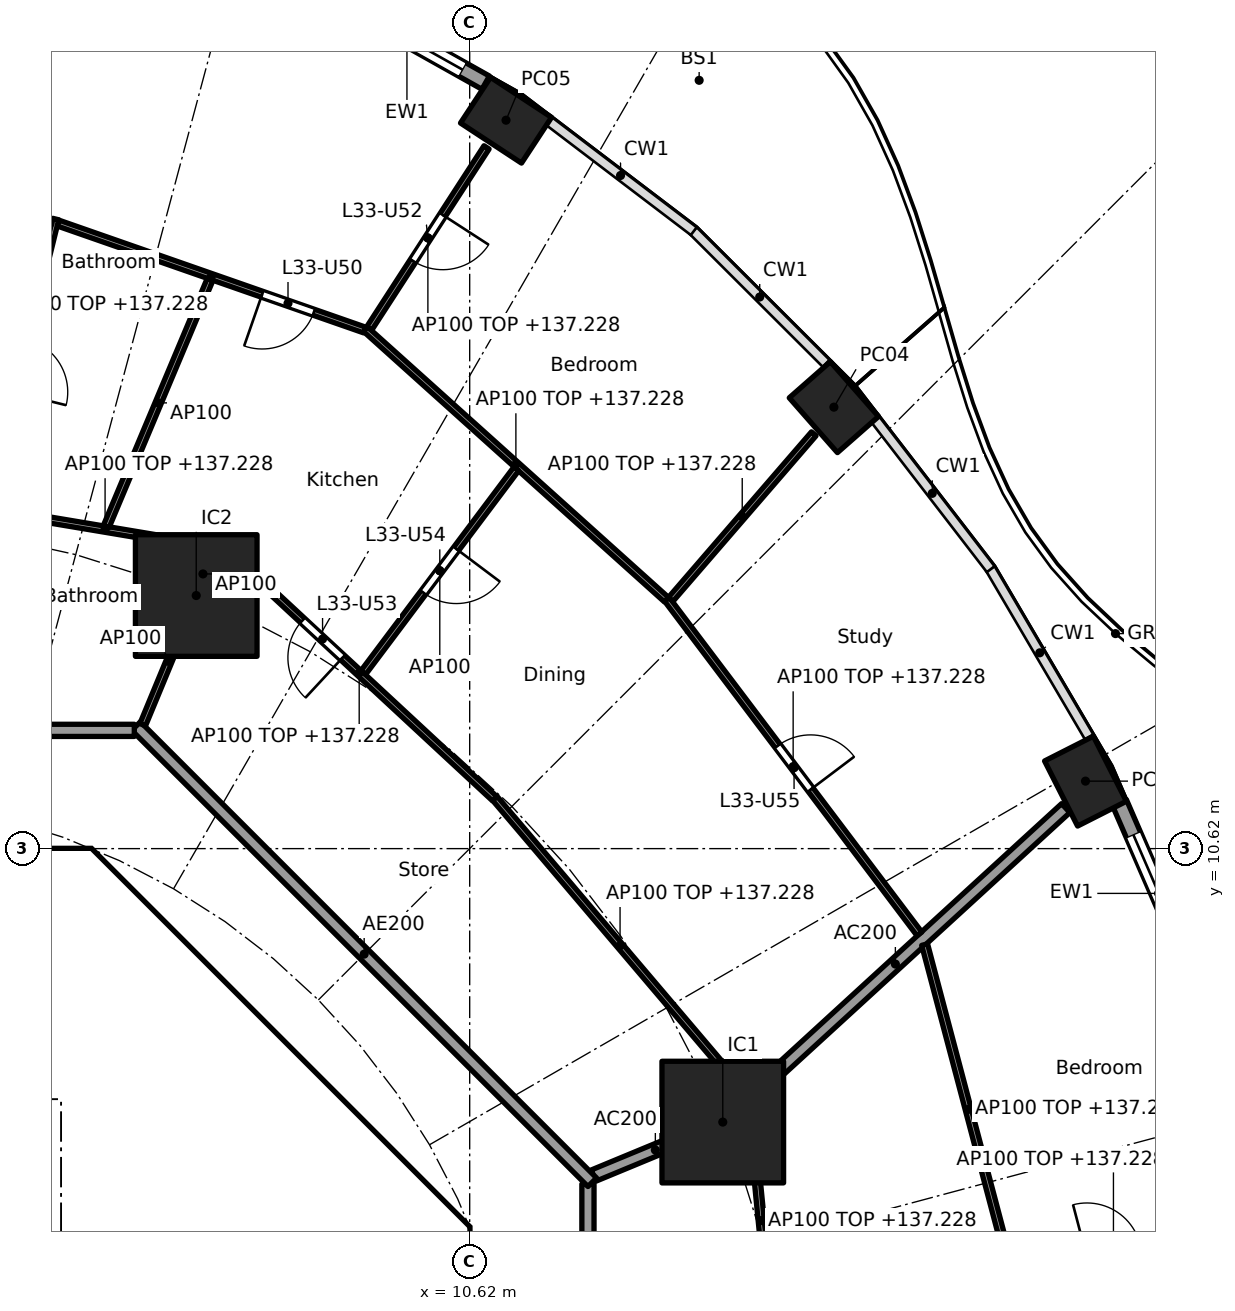
"""IFC4 building model, lengths in metres.
Left out: names, types, materials, properties, quantities, classifications, styles, units other than length and angle.
Written with IfcOpenShell. Run it as: python <this file> out.ifc"""

import sys

from ifc_helpers import new_model, si_unit, direction, frame, frame_2d, origin, origin_2d, place, context, subcontext, project, spatial, polyline, rectangle, hollow_rectangle, outline, extrude, element, fill, save


model = new_model("IFC4")
c1 = context("Model", 3, precision=1e-05, world=origin(), true_north=direction((0.0, 1.0)))
c2 = subcontext(c1, "Body", "Model", "MODEL_VIEW")
j1 = project(units=[si_unit("LENGTHUNIT", "METRE"), si_unit("PLANEANGLEUNIT", "RADIAN")], contexts=[c1])
p1 = place(None, origin())
s1 = spatial("IfcSite", under=j1, at=p1, CompositionType="ELEMENT")
p2 = place(p1, origin())
s2 = spatial("IfcBuilding", under=s1, at=p2, CompositionType="ELEMENT")
p3 = place(p2, frame((0.0, 0.0, 134.4)))
s3 = spatial("IfcBuildingStorey", under=s2, at=p3, CompositionType="ELEMENT", Elevation=134.4)
for number, where, z_axis, x_axis in (
    (1, (20.747, 11.73, 0.0), (0.0, 0.0, 1.0), (-0.452, 0.892, 0.0)),
    (2, (16.61, 17.88, 0.0), (0.0, 0.0, 1.0), (-0.66, 0.751, 0.0)),
    (3, (11.218, 22.599, 0.0), (0.0, 0.0, 1.0), (-0.836, 0.549, 0.0)),
):
    element("IfcColumn", number, at=place(p3, frame(where, z_axis=z_axis, x_axis=x_axis)), inside=s3, PredefinedType="COLUMN", context=c2, shape_type="SweptSolid", body=[
        extrude(hollow_rectangle(XDim=1.2, YDim=0.9, WallThickness=0.04, at=origin_2d()), origin(), (0.0, 0.0, 1.0), 3.7),
    ])
for number, where, z_axis, x_axis in (
    (4, (14.782, 6.123, 0.0), (0.0, 0.0, 1.0), (1.0, 0.0, 0.0)),
    (5, (6.123, 14.782, 0.0), (0.0, 0.0, 1.0), (1.0, 0.0, 0.0)),
):
    element("IfcColumn", number, at=place(p3, frame(where, z_axis=z_axis, x_axis=x_axis)), inside=s3, PredefinedType="COLUMN", context=c2, shape_type="SweptSolid", body=[
        extrude(rectangle(XDim=2.0, YDim=2.0, at=origin_2d()), origin(), (0.0, 0.0, 1.0), 3.7),
    ])
p4 = place(p3, frame((21.304, 11.38, 0.0), z_axis=(0.0, 0.0, 1.0), x_axis=(0.397575919276, -0.917569282622, 0.0)))
e6 = element("IfcWall", 6, at=p4, inside=s3, PredefinedType="SOLIDWALL", context=c2, shape_type="SweptSolid", body=[
    extrude(rectangle(XDim=3.261, YDim=0.25, at=frame_2d((1.63, 0.0))), origin(), (0.0, 0.0, 1.0), 3.44),
])
p5 = place(p4, frame((0.58, 0.0, 0.0)))
e7 = element("IfcOpeningElement", 7, at=p5, cuts=e6, PredefinedType="OPENING", context=c2, shape_type="SweptSolid", body=[
    extrude(rectangle(XDim=2.1, YDim=2.4, at=frame_2d((1.05, 1.2))), frame((0.0, 0.135, 0.0), z_axis=(0.0, -1.0, 0.0), x_axis=(1.0, 0.0, 0.0)), (0.0, 0.0, 1.0), 0.27),
])
p6 = place(p3, frame((8.293, 24.67, 0.0), z_axis=(0.0, 0.0, 1.0), x_axis=(0.87206688547, -0.489386705241, 0.0)))
e8 = element("IfcWall", 8, at=p6, inside=s3, PredefinedType="SOLIDWALL", context=c2, shape_type="SweptSolid", body=[
    extrude(rectangle(XDim=2.97, YDim=0.25, at=frame_2d((1.485, 0.0))), origin(), (0.0, 0.0, 1.0), 3.44),
])
p7 = place(p6, frame((0.435, 0.0, 0.0)))
e9 = element("IfcOpeningElement", 9, at=p7, cuts=e8, PredefinedType="OPENING", context=c2, shape_type="SweptSolid", body=[
    extrude(rectangle(XDim=2.1, YDim=2.4, at=frame_2d((1.05, 1.2))), frame((0.0, 0.135, 0.0), z_axis=(0.0, -1.0, 0.0), x_axis=(1.0, 0.0, 0.0)), (0.0, 0.0, 1.0), 0.27),
])
p8 = place(p3, frame((9.988, 4.613, 0.0), z_axis=(0.0, 0.0, 1.0), x_axis=(-0.707106781187, 0.707106781187, 0.0)))
e10 = element("IfcWall", 10, at=p8, inside=s3, PredefinedType="SHEAR", context=c2, shape_type="SweptSolid", body=[
    extrude(rectangle(XDim=7.602, YDim=0.6, at=frame_2d((3.801, 0.0))), origin(), (0.0, 0.0, 1.0), 3.44),
])
p9 = place(p8, frame((3.201, 0.0, 0.0)))
e11 = element("IfcOpeningElement", 11, at=p9, cuts=e10, PredefinedType="OPENING", context=c2, shape_type="SweptSolid", body=[
    extrude(rectangle(XDim=1.2, YDim=2.1, at=frame_2d((0.6, 1.05))), frame((0.0, 0.31, 0.0), z_axis=(0.0, -1.0, 0.0), x_axis=(1.0, 0.0, 0.0)), (0.0, 0.0, 1.0), 0.62),
])
p10 = place(p3, frame((4.0, 4.3, 0.0), z_axis=(0.0, 0.0, 1.0), x_axis=(0.0, 1.0, 0.0)))
e12 = element("IfcWall", 12, at=p10, inside=s3, PredefinedType="SOLIDWALL", context=c2, shape_type="SweptSolid", body=[
    extrude(rectangle(XDim=2.2, YDim=0.2, at=frame_2d((1.1, 0.0))), origin(), (0.0, 0.0, 1.0), 3.44),
])
p11 = place(p10, frame((0.55, 0.0, 0.0)))
e13 = element("IfcOpeningElement", 13, at=p11, cuts=e12, PredefinedType="OPENING", context=c2, shape_type="SweptSolid", body=[
    extrude(rectangle(XDim=1.1, YDim=2.1, at=frame_2d((0.55, 1.05))), frame((0.0, 0.11, 0.0), z_axis=(0.0, -1.0, 0.0), x_axis=(1.0, 0.0, 0.0)), (0.0, 0.0, 1.0), 0.22),
])
p12 = place(p3, frame((4.0, 7.025, 0.0), z_axis=(0.0, 0.0, 1.0), x_axis=(0.0, 1.0, 0.0)))
e14 = element("IfcWall", 14, at=p12, inside=s3, PredefinedType="SOLIDWALL", context=c2, shape_type="SweptSolid", body=[
    extrude(rectangle(XDim=3.0, YDim=0.2, at=frame_2d((1.5, 0.0))), origin(), (0.0, 0.0, 1.0), 3.44),
])
p13 = place(p12, frame((0.925, 0.0, 0.0)))
e15 = element("IfcOpeningElement", 15, at=p13, cuts=e14, PredefinedType="OPENING", context=c2, shape_type="SweptSolid", body=[
    extrude(rectangle(XDim=1.1, YDim=2.1, at=frame_2d((0.55, 1.05))), frame((0.0, 0.11, 0.0), z_axis=(0.0, -1.0, 0.0), x_axis=(1.0, 0.0, 0.0)), (0.0, 0.0, 1.0), 0.22),
])
p14 = place(p3, origin())
e16 = element("IfcWall", 16, at=p14, inside=s3, PredefinedType="SHEAR", context=c2, shape_type="SweptSolid", body=[
    extrude(outline(polyline([(-4.152, 10.025), (-4.401, 9.776), (-4.825, 10.2), (-4.401, 10.625), (4.401, 10.625), (4.825, 10.2), (4.401, 9.776), (4.152, 10.025), (-4.152, 10.025)])), origin(), (0.0, 0.0, 1.0), 3.44),
])
p15 = place(p3, origin())
e17 = element("IfcWall", 17, at=p15, inside=s3, PredefinedType="SHEAR", context=c2, shape_type="SweptSolid", body=[
    extrude(outline(polyline([(9.776, -4.401), (10.025, -4.152), (10.025, -3.801), (10.025, 4.152), (9.776, 4.401), (10.2, 4.825), (10.625, 4.401), (10.625, -4.401), (10.2, -4.825), (9.776, -4.401)])), origin(), (0.0, 0.0, 1.0), 3.44),
])
p16 = place(p3, origin())
e18 = element("IfcWall", 18, at=p16, inside=s3, PredefinedType="SOLIDWALL", context=c2, shape_type="SweptSolid", body=[
    extrude(outline(polyline([(4.1, 6.5), (-4.1, 6.5), (-4.1, 7.025), (4.1, 7.025), (4.1, 6.5)])), origin(), (0.0, 0.0, 1.0), 3.44),
])
p17 = place(p3, frame((12.657, 5.243, 0.0), z_axis=(0.0, 0.0, 1.0), x_axis=(0.923876145736, 0.382691608661, 0.0)))
e19 = element("IfcWall", 19, at=p17, inside=s3, PredefinedType="PARTITIONING", context=c2, shape_type="SweptSolid", body=[
    extrude(rectangle(XDim=2.2, YDim=0.2, at=frame_2d((1.1, 0.0))), origin(), (0.0, 0.0, 1.0), 3.44),
])
p18 = place(p3, frame((14.819, 6.157, 0.0), z_axis=(0.0, 0.0, 1.0), x_axis=(0.737608883396, 0.675228209671, 0.0)))
e20 = element("IfcWall", 20, at=p18, inside=s3, PredefinedType="PARTITIONING", context=c2, shape_type="SweptSolid", body=[
    extrude(rectangle(XDim=7.596, YDim=0.2, at=frame_2d((3.798, 0.0))), origin(), (0.0, 0.0, 1.0), 3.44),
])
p19 = place(p3, frame((12.565, -5.104, 0.0), z_axis=(0.0, 0.0, 1.0), x_axis=(0.0, 1.0, 0.0)))
e21 = element("IfcWall", 21, at=p19, inside=s3, PredefinedType="PARTITIONING", context=c2, shape_type="SweptSolid", body=[
    extrude(rectangle(XDim=10.209, YDim=0.2, at=frame_2d((5.104, 0.0))), origin(), (0.0, 0.0, 1.0), 3.44),
])
p20 = place(p3, frame((12.635, 5.134, 0.0), z_axis=(0.0, 0.0, 1.0), x_axis=(-0.707106781187, 0.707106781187, 0.0)))
e22 = element("IfcWall", 22, at=p20, inside=s3, PredefinedType="PARTITIONING", context=c2, shape_type="SweptSolid", body=[
    extrude(rectangle(XDim=10.609, YDim=0.2, at=frame_2d((5.305, 0.0))), origin(), (0.0, 0.0, 1.0), 3.44),
])
p21 = place(p3, frame((5.104, 12.565, 0.0), z_axis=(0.0, 0.0, 1.0), x_axis=(-1.0, 0.0, 0.0)))
e23 = element("IfcWall", 23, at=p21, inside=s3, PredefinedType="PARTITIONING", context=c2, shape_type="SweptSolid", body=[
    extrude(rectangle(XDim=10.409, YDim=0.2, at=frame_2d((5.205, 0.0))), origin(), (0.0, 0.0, 1.0), 3.44),
])
p22 = place(p21, frame((4.604, 0.0, 0.0)))
e24 = element("IfcOpeningElement", 24, at=p22, cuts=e23, PredefinedType="OPENING", context=c2, shape_type="SweptSolid", body=[
    extrude(rectangle(XDim=1.0, YDim=2.1, at=frame_2d((0.5, 1.05))), frame((0.0, 0.11, 0.0), z_axis=(0.0, -1.0, 0.0), x_axis=(1.0, 0.0, 0.0)), (0.0, 0.0, 1.0), 0.22),
])
p23 = place(p3, frame((15.602, 2.584, 0.0), z_axis=(0.0, 0.0, 1.0), x_axis=(-0.097196343206, 0.995265226393, 0.0)))
e25 = element("IfcWall", 25, at=p23, inside=s3, PredefinedType="PARTITIONING", context=c2, shape_type="SweptSolid", body=[
    extrude(rectangle(XDim=3.856, YDim=0.1, at=frame_2d((1.928, 0.0))), origin(), (0.0, 0.0, 1.0), 2.828),
])
p24 = place(p3, frame((19.598, 3.584, 0.0), z_axis=(0.0, 0.0, 1.0), x_axis=(0.967108750962, 0.254363251695, 0.0)))
e26 = element("IfcWall", 26, at=p24, inside=s3, PredefinedType="PARTITIONING", context=c2, shape_type="SweptSolid", body=[
    extrude(rectangle(XDim=3.327, YDim=0.1, at=frame_2d((1.663, 0.0))), origin(), (0.0, 0.0, 1.0), 2.828),
])
p25 = place(p24, frame((1.213, 0.0, 0.0)))
e27 = element("IfcOpeningElement", 27, at=p25, cuts=e26, PredefinedType="OPENING", context=c2, shape_type="SweptSolid", body=[
    extrude(rectangle(XDim=0.9, YDim=2.1, at=frame_2d((0.45, 1.05))), frame((0.0, 0.06, 0.0), z_axis=(0.0, -1.0, 0.0), x_axis=(1.0, 0.0, 0.0)), (0.0, 0.0, 1.0), 0.12),
])
p26 = place(p3, frame((19.537, 3.62, 0.0), z_axis=(0.0, 0.0, 1.0), x_axis=(-0.255909310473, 0.966700793841, 0.0)))
e28 = element("IfcWall", 28, at=p26, inside=s3, PredefinedType="PARTITIONING", context=c2, shape_type="SweptSolid", body=[
    extrude(rectangle(XDim=5.609, YDim=0.1, at=frame_2d((2.804, 0.0))), origin(), (0.0, 0.0, 1.0), 2.828),
])
p27 = place(p3, frame((15.153, 6.597, 0.0), z_axis=(0.0, 0.0, 1.0), x_axis=(-0.647372160855, 0.762174051874, 0.0)))
e29 = element("IfcWall", 29, at=p27, inside=s3, PredefinedType="PARTITIONING", context=c2, shape_type="SweptSolid", body=[
    extrude(rectangle(XDim=6.363, YDim=0.1, at=frame_2d((3.181, 0.0))), origin(), (0.0, 0.0, 1.0), 2.828),
])
p28 = place(p3, frame((18.016, 9.218, 0.0), z_axis=(0.0, 0.0, 1.0), x_axis=(-0.602411163107, 0.798185937338, 0.0)))
e30 = element("IfcWall", 30, at=p28, inside=s3, PredefinedType="PARTITIONING", context=c2, shape_type="SweptSolid", body=[
    extrude(rectangle(XDim=6.894, YDim=0.1, at=frame_2d((3.447, 0.0))), origin(), (0.0, 0.0, 1.0), 2.828),
])
p29 = place(p28, frame((2.972, 0.0, 0.0)))
e31 = element("IfcOpeningElement", 31, at=p29, cuts=e30, PredefinedType="OPENING", context=c2, shape_type="SweptSolid", body=[
    extrude(rectangle(XDim=0.9, YDim=2.1, at=frame_2d((0.45, 1.05))), frame((0.0, 0.06, 0.0), z_axis=(0.0, -1.0, 0.0), x_axis=(1.0, 0.0, 0.0)), (0.0, 0.0, 1.0), 0.12),
])
p30 = place(p3, frame((11.029, 11.443, 0.0), z_axis=(0.0, 0.0, 1.0), x_axis=(-0.733121281629, 0.680097924143, 0.0)))
e32 = element("IfcWall", 32, at=p30, inside=s3, PredefinedType="PARTITIONING", context=c2, shape_type="SweptSolid", body=[
    extrude(rectangle(XDim=6.073, YDim=0.1, at=frame_2d((3.037, 0.0))), origin(), (0.0, 0.0, 1.0), 2.828),
])
p31 = place(p30, frame((3.408, 0.0, 0.0)))
e33 = element("IfcOpeningElement", 33, at=p31, cuts=e32, PredefinedType="OPENING", context=c2, shape_type="SweptSolid", body=[
    extrude(rectangle(XDim=0.9, YDim=2.1, at=frame_2d((0.45, 1.05))), frame((0.0, 0.06, 0.0), z_axis=(0.0, -1.0, 0.0), x_axis=(1.0, 0.0, 0.0)), (0.0, 0.0, 1.0), 0.12),
])
p32 = place(p3, frame((13.926, 14.719, 0.0), z_axis=(0.0, 0.0, 1.0), x_axis=(0.653831857253, 0.756639876323, 0.0)))
e34 = element("IfcWall", 34, at=p32, inside=s3, PredefinedType="PARTITIONING", context=c2, shape_type="SweptSolid", body=[
    extrude(rectangle(XDim=3.598, YDim=0.1, at=frame_2d((1.799, 0.0))), origin(), (0.0, 0.0, 1.0), 2.828),
])
p33 = place(p3, frame((13.856, 14.714, 0.0), z_axis=(0.0, 0.0, 1.0), x_axis=(-0.743793479211, 0.668409500444, 0.0)))
e35 = element("IfcWall", 35, at=p33, inside=s3, PredefinedType="PARTITIONING", context=c2, shape_type="SweptSolid", body=[
    extrude(rectangle(XDim=6.659, YDim=0.1, at=frame_2d((3.329, 0.0))), origin(), (0.0, 0.0, 1.0), 2.828),
])
p34 = place(p3, frame((8.87, 13.514, 0.0), z_axis=(0.0, 0.0, 1.0), x_axis=(0.600475102839, 0.79964345234, 0.0)))
e36 = element("IfcWall", 36, at=p34, inside=s3, PredefinedType="PARTITIONING", context=c2, shape_type="SweptSolid", body=[
    extrude(rectangle(XDim=4.192, YDim=0.1, at=frame_2d((2.096, 0.0))), origin(), (0.0, 0.0, 1.0), 3.44),
])
p35 = place(p34, frame((1.646, 0.0, 0.0)))
e37 = element("IfcOpeningElement", 37, at=p35, cuts=e36, PredefinedType="OPENING", context=c2, shape_type="SweptSolid", body=[
    extrude(rectangle(XDim=0.9, YDim=2.1, at=frame_2d((0.45, 1.05))), frame((0.0, 0.06, 0.0), z_axis=(0.0, -1.0, 0.0), x_axis=(1.0, 0.0, 0.0)), (0.0, 0.0, 1.0), 0.12),
])
p36 = place(p3, frame((5.243, 12.657, 0.0), z_axis=(0.0, 0.0, 1.0), x_axis=(0.382719158442, 0.923864733477, 0.0)))
e38 = element("IfcWall", 38, at=p36, inside=s3, PredefinedType="PARTITIONING", context=c2, shape_type="SweptSolid", body=[
    extrude(rectangle(XDim=2.25, YDim=0.1, at=frame_2d((1.125, 0.0))), origin(), (0.0, 0.0, 1.0), 3.44),
])
p37 = place(p3, frame((6.564, 15.547, 0.0), z_axis=(0.0, 0.0, 1.0), x_axis=(-0.986269521186, 0.165143669511, 0.0)))
e39 = element("IfcWall", 39, at=p37, inside=s3, PredefinedType="PARTITIONING", context=c2, shape_type="SweptSolid", body=[
    extrude(rectangle(XDim=3.934, YDim=0.1, at=frame_2d((1.967, 0.0))), origin(), (0.0, 0.0, 1.0), 2.828),
])
p38 = place(p3, frame((8.968, 19.174, 0.0), z_axis=(0.0, 0.0, 1.0), x_axis=(0.543713319379, 0.83927100887, 0.0)))
e40 = element("IfcWall", 40, at=p38, inside=s3, PredefinedType="PARTITIONING", context=c2, shape_type="SweptSolid", body=[
    extrude(rectangle(XDim=3.549, YDim=0.1, at=frame_2d((1.774, 0.0))), origin(), (0.0, 0.0, 1.0), 2.828),
])
p39 = place(p38, frame((1.324, 0.0, 0.0)))
e41 = element("IfcOpeningElement", 41, at=p39, cuts=e40, PredefinedType="OPENING", context=c2, shape_type="SweptSolid", body=[
    extrude(rectangle(XDim=0.9, YDim=2.1, at=frame_2d((0.45, 1.05))), frame((0.0, 0.06, 0.0), z_axis=(0.0, -1.0, 0.0), x_axis=(1.0, 0.0, 0.0)), (0.0, 0.0, 1.0), 0.12),
])
p40 = place(p3, frame((8.894, 19.148, 0.0), z_axis=(0.0, 0.0, 1.0), x_axis=(-0.944182005381, 0.329424256414, 0.0)))
e42 = element("IfcWall", 42, at=p40, inside=s3, PredefinedType="PARTITIONING", context=c2, shape_type="SweptSolid", body=[
    extrude(rectangle(XDim=5.344, YDim=0.1, at=frame_2d((2.672, 0.0))), origin(), (0.0, 0.0, 1.0), 2.828),
])
p41 = place(p40, frame((0.886, 0.0, 0.0)))
e43 = element("IfcOpeningElement", 43, at=p41, cuts=e42, PredefinedType="OPENING", context=c2, shape_type="SweptSolid", body=[
    extrude(rectangle(XDim=0.9, YDim=2.1, at=frame_2d((0.45, 1.05))), frame((0.0, 0.06, 0.0), z_axis=(0.0, -1.0, 0.0), x_axis=(1.0, 0.0, 0.0)), (0.0, 0.0, 1.0), 0.12),
])
p42 = place(p3, frame((4.643, 15.918, 0.0), z_axis=(0.0, 0.0, 1.0), x_axis=(0.387539433367, 0.921853126906, 0.0)))
e44 = element("IfcWall", 44, at=p42, inside=s3, PredefinedType="PARTITIONING", context=c2, shape_type="SweptSolid", body=[
    extrude(rectangle(XDim=4.408, YDim=0.1, at=frame_2d((2.204, 0.0))), origin(), (0.0, 0.0, 1.0), 3.44),
])
p43 = place(p3, frame((1.759, 12.662, 0.0), z_axis=(0.0, 0.0, 1.0), x_axis=(0.239964949221, 0.970781552743, 0.0)))
e45 = element("IfcWall", 45, at=p43, inside=s3, PredefinedType="PARTITIONING", context=c2, shape_type="SweptSolid", body=[
    extrude(rectangle(XDim=8.562, YDim=0.1, at=frame_2d((4.281, 0.0))), origin(), (0.0, 0.0, 1.0), 2.756),
])
p44 = place(p43, frame((1.375, 0.0, 0.0)))
e46 = element("IfcOpeningElement", 46, at=p44, cuts=e45, PredefinedType="OPENING", context=c2, shape_type="SweptSolid", body=[
    extrude(rectangle(XDim=0.9, YDim=2.1, at=frame_2d((0.45, 1.05))), frame((0.0, 0.06, 0.0), z_axis=(0.0, -1.0, 0.0), x_axis=(1.0, 0.0, 0.0)), (0.0, 0.0, 1.0), 0.12),
])
p45 = place(p43, frame((5.631, 0.0, 0.0)))
e47 = element("IfcOpeningElement", 47, at=p45, cuts=e45, PredefinedType="OPENING", context=c2, shape_type="SweptSolid", body=[
    extrude(rectangle(XDim=0.9, YDim=2.1, at=frame_2d((0.45, 1.05))), frame((0.0, 0.06, 0.0), z_axis=(0.0, -1.0, 0.0), x_axis=(1.0, 0.0, 0.0)), (0.0, 0.0, 1.0), 0.12),
])
p46 = place(p3, frame((6.417, 15.42, 0.0), z_axis=(0.0, 0.0, 1.0), x_axis=(-0.543777264953, -0.839229578911, 0.0)))
e48 = element("IfcWall", 48, at=p46, inside=s3, PredefinedType="PARTITIONING", context=c2, shape_type="SweptSolid", body=[
    extrude(rectangle(XDim=0.673, YDim=0.1, at=frame_2d((0.337, 0.0))), origin(), (0.0, 0.0, 1.0), 3.44),
])
p47 = place(p5, origin())
e49 = element("IfcDoor", 49, at=p47, inside=s3, OperationType="SLIDING_TO_LEFT", PredefinedType="DOOR", context=c2, shape_type="SweptSolid", body=[
    extrude(rectangle(XDim=2.1, YDim=2.4, at=frame_2d((1.05, 1.2))), frame((0.0, 0.025, 0.0), z_axis=(0.0, -1.0, 0.0), x_axis=(1.0, 0.0, 0.0)), (0.0, 0.0, 1.0), 0.05),
])
fill(e7, e49)
p48 = place(p7, origin())
e50 = element("IfcDoor", 50, at=p48, inside=s3, OperationType="SLIDING_TO_LEFT", PredefinedType="DOOR", context=c2, shape_type="SweptSolid", body=[
    extrude(rectangle(XDim=2.1, YDim=2.4, at=frame_2d((1.05, 1.2))), frame((0.0, 0.025, 0.0), z_axis=(0.0, -1.0, 0.0), x_axis=(1.0, 0.0, 0.0)), (0.0, 0.0, 1.0), 0.05),
])
fill(e9, e50)
p49 = place(p11, origin())
e51 = element("IfcDoor", 51, at=p49, inside=s3, OperationType="DOUBLE_DOOR_SLIDING", PredefinedType="DOOR", context=c2, shape_type="SweptSolid", body=[
    extrude(rectangle(XDim=1.1, YDim=2.1, at=frame_2d((0.55, 1.05))), frame((0.0, 0.025, 0.0), z_axis=(0.0, -1.0, 0.0), x_axis=(1.0, 0.0, 0.0)), (0.0, 0.0, 1.0), 0.05),
])
fill(e13, e51)
p50 = place(p13, origin())
e52 = element("IfcDoor", 52, at=p50, inside=s3, OperationType="SINGLE_SWING_RIGHT", PredefinedType="DOOR", context=c2, shape_type="SweptSolid", body=[
    extrude(rectangle(XDim=1.1, YDim=2.1, at=frame_2d((0.55, 1.05))), frame((0.0, 0.025, 0.0), z_axis=(0.0, -1.0, 0.0), x_axis=(1.0, 0.0, 0.0)), (0.0, 0.0, 1.0), 0.05),
])
fill(e15, e52)
p51 = place(p9, origin())
e53 = element("IfcDoor", 53, at=p51, inside=s3, OperationType="SINGLE_SWING_LEFT", PredefinedType="DOOR", context=c2, shape_type="SweptSolid", body=[
    extrude(rectangle(XDim=1.2, YDim=2.1, at=frame_2d((0.6, 1.05))), frame((0.0, 0.025, 0.0), z_axis=(0.0, -1.0, 0.0), x_axis=(1.0, 0.0, 0.0)), (0.0, 0.0, 1.0), 0.05),
])
fill(e11, e53)
p52 = place(p41, origin())
e54 = element("IfcDoor", 54, at=p52, inside=s3, OperationType="SINGLE_SWING_RIGHT", PredefinedType="DOOR", context=c2, shape_type="SweptSolid", body=[
    extrude(rectangle(XDim=0.9, YDim=2.1, at=frame_2d((0.45, 1.05))), frame((0.0, 0.025, 0.0), z_axis=(0.0, -1.0, 0.0), x_axis=(1.0, 0.0, 0.0)), (0.0, 0.0, 1.0), 0.05),
])
fill(e43, e54)
p53 = place(p39, frame((0.9, 0.0, 0.0), x_axis=(-1.0, 0.0, 0.0)))
e55 = element("IfcDoor", 55, at=p53, inside=s3, OperationType="SINGLE_SWING_LEFT", PredefinedType="DOOR", context=c2, shape_type="SweptSolid", body=[
    extrude(rectangle(XDim=0.9, YDim=2.1, at=frame_2d((0.45, 1.05))), frame((0.0, 0.025, 0.0), z_axis=(0.0, -1.0, 0.0), x_axis=(1.0, 0.0, 0.0)), (0.0, 0.0, 1.0), 0.05),
])
fill(e41, e55)
p54 = place(p31, origin())
e56 = element("IfcDoor", 56, at=p54, inside=s3, OperationType="SINGLE_SWING_LEFT", PredefinedType="DOOR", context=c2, shape_type="SweptSolid", body=[
    extrude(rectangle(XDim=0.9, YDim=2.1, at=frame_2d((0.45, 1.05))), frame((0.0, 0.025, 0.0), z_axis=(0.0, -1.0, 0.0), x_axis=(1.0, 0.0, 0.0)), (0.0, 0.0, 1.0), 0.05),
])
fill(e33, e56)
p55 = place(p35, frame((0.9, 0.0, 0.0), x_axis=(-1.0, 0.0, 0.0)))
e57 = element("IfcDoor", 57, at=p55, inside=s3, OperationType="SINGLE_SWING_LEFT", PredefinedType="DOOR", context=c2, shape_type="SweptSolid", body=[
    extrude(rectangle(XDim=0.9, YDim=2.1, at=frame_2d((0.45, 1.05))), frame((0.0, 0.025, 0.0), z_axis=(0.0, -1.0, 0.0), x_axis=(1.0, 0.0, 0.0)), (0.0, 0.0, 1.0), 0.05),
])
fill(e37, e57)
p56 = place(p29, frame((0.9, 0.0, 0.0), x_axis=(-1.0, 0.0, 0.0)))
e58 = element("IfcDoor", 58, at=p56, inside=s3, OperationType="SINGLE_SWING_RIGHT", PredefinedType="DOOR", context=c2, shape_type="SweptSolid", body=[
    extrude(rectangle(XDim=0.9, YDim=2.1, at=frame_2d((0.45, 1.05))), frame((0.0, 0.025, 0.0), z_axis=(0.0, -1.0, 0.0), x_axis=(1.0, 0.0, 0.0)), (0.0, 0.0, 1.0), 0.05),
])
fill(e31, e58)
save(model, sys.argv[1])
